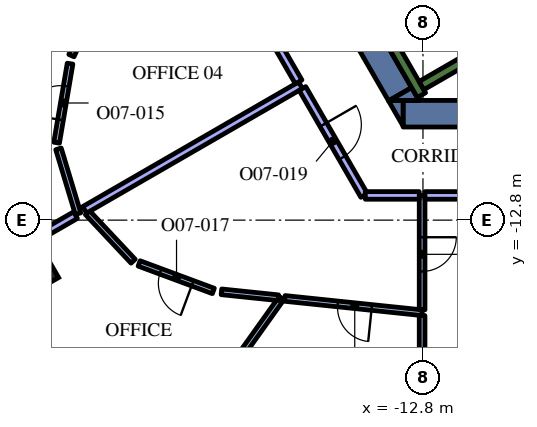
"""IFC4 building model, lengths in metres.
Left out: names, types, materials, properties, quantities, classifications, styles, units other than length and angle.
Written with IfcOpenShell. Run it as: python <this file> out.ifc"""

import sys

from ifc_helpers import new_model, si_unit, direction, frame, frame_2d, origin, origin_2d, place, context, subcontext, project, spatial, polyline, rectangle, outline, extrude, element, fill, save


model = new_model("IFC4")
c1 = context("Model", 3, precision=1e-05, world=origin(), true_north=direction((0.0, 1.0)))
c2 = subcontext(c1, "Body", "Model", "MODEL_VIEW")
j1 = project(units=[si_unit("LENGTHUNIT", "METRE"), si_unit("PLANEANGLEUNIT", "RADIAN")], contexts=[c1])
p1 = place(None, origin())
s1 = spatial("IfcSite", under=j1, at=p1, CompositionType="ELEMENT")
p2 = place(p1, origin())
s2 = spatial("IfcBuilding", under=s1, at=p2, CompositionType="ELEMENT")
p3 = place(p2, frame((0.0, 0.0, 218.4)))
s3 = spatial("IfcBuildingStorey", under=s2, at=p3, CompositionType="ELEMENT", Elevation=218.4)
p4 = place(p3, frame((-24.027, -13.872, 0.0), z_axis=(0.0, 0.0, 1.0), x_axis=(-0.866025403784, -0.5, 0.0)))
e1 = element("IfcColumn", 1, at=p4, inside=s3, PredefinedType="COLUMN", context=c2, shape_type="SweptSolid", body=[
    extrude(rectangle(XDim=2.4, YDim=2.4, at=origin_2d()), origin(), (0.0, 0.0, 1.0), 4.2),
])
p5 = place(p3, frame((8.904, -10.0, 0.0), z_axis=(0.0, 0.0, 1.0), x_axis=(-1.0, 0.0, 0.0)))
e2 = element("IfcWall", 2, at=p5, inside=s3, PredefinedType="SOLIDWALL", context=c2, shape_type="SweptSolid", body=[
    extrude(rectangle(XDim=22.226, YDim=0.7, at=frame_2d((11.113, 0.0))), origin(), (0.0, 0.0, 1.0), 4.2),
])
p6 = place(p3, origin())
e3 = element("IfcWall", 3, at=p6, inside=s3, PredefinedType="SOLIDWALL", context=c2, shape_type="SweptSolid", body=[
    extrude(outline(polyline([(-13.712, -9.65), (-13.324, -9.65), (-13.324, -10.322), (-13.712, -9.65)])), origin(), (0.0, 0.0, 1.0), 4.2),
])
p7 = place(p3, frame((-13.402, -9.487, 0.0), z_axis=(0.0, 0.0, 1.0), x_axis=(-0.500020498207, 0.866013568815, 0.0)))
e4 = element("IfcWall", 4, at=p7, inside=s3, PredefinedType="SOLIDWALL", context=c2, shape_type="SweptSolid", body=[
    extrude(rectangle(XDim=3.829, YDim=0.7, at=frame_2d((1.915, 0.0))), origin(), (0.0, 0.0, 1.0), 4.2),
])
e5 = element("IfcWall", 5, at=p6, inside=s3, PredefinedType="SOLIDWALL", context=c2, shape_type="SweptSolid", body=[
    extrude(outline(polyline([(-12.904, -9.65), (-13.68, -9.65), (-13.098, -9.314), (-12.904, -9.65)])), origin(), (0.0, 0.0, 1.0), 4.2),
])
p8 = place(p3, frame((-12.84, -9.511, 0.0), z_axis=(0.0, 0.0, 1.0), x_axis=(-0.499997733992, 0.866026712061, 0.0)))
e6 = element("IfcWall", 6, at=p8, inside=s3, PredefinedType="SOLIDWALL", context=c2, shape_type="SweptSolid", body=[
    extrude(rectangle(XDim=3.634, YDim=0.25, at=frame_2d((1.817, 0.0))), origin(), (0.0, 0.0, 1.0), 4.2),
])
p9 = place(p3, frame((-12.84, -9.261, 0.0), z_axis=(0.0, 0.0, 1.0), x_axis=(0.866016039709, 0.500016218704, 0.0)))
e7 = element("IfcWall", 7, at=p9, inside=s3, PredefinedType="SOLIDWALL", context=c2, shape_type="SweptSolid", body=[
    extrude(rectangle(XDim=7.05, YDim=0.25, at=frame_2d((3.525, 0.0))), origin(), (0.0, 0.0, 1.0), 4.2),
])
p10 = place(p3, frame((-21.386, -6.983, 0.0), z_axis=(0.0, 0.0, 1.0), x_axis=(-0.407597309494, -0.91316177827, 0.0)))
e8 = element("IfcWall", 8, at=p10, inside=s3, PredefinedType="PARTITIONING", context=c2, shape_type="SweptSolid", body=[
    extrude(rectangle(XDim=1.63, YDim=0.15, at=frame_2d((0.815, 0.0))), origin(), (0.0, 0.0, 1.0), 3.45),
])
p11 = place(p3, frame((-22.44, -10.763, 0.0), z_axis=(0.0, 0.0, 1.0), x_axis=(0.167682096872, 0.985841120257, 0.0)))
e9 = element("IfcWall", 9, at=p11, inside=s3, PredefinedType="PARTITIONING", context=c2, shape_type="SweptSolid", body=[
    extrude(rectangle(XDim=2.11, YDim=0.15, at=frame_2d((1.055, 0.0))), origin(), (0.0, 0.0, 1.0), 3.45),
])
p12 = place(p11, frame((0.61, 0.0, 0.0)))
e10 = element("IfcOpeningElement", 10, at=p12, cuts=e9, PredefinedType="OPENING", context=c2, shape_type="SweptSolid", body=[
    extrude(rectangle(XDim=0.9, YDim=2.1, at=frame_2d((0.45, 1.05))), frame((0.0, 0.085, 0.0), z_axis=(0.0, -1.0, 0.0), x_axis=(1.0, 0.0, 0.0)), (0.0, 0.0, 1.0), 0.17),
])
p13 = place(p3, frame((-22.391, -10.924, 0.0), z_axis=(0.0, 0.0, 1.0), x_axis=(0.288642134652, -0.957437056993, 0.0)))
e11 = element("IfcWall", 11, at=p13, inside=s3, PredefinedType="PARTITIONING", context=c2, shape_type="SweptSolid", body=[
    extrude(rectangle(XDim=1.782, YDim=0.15, at=frame_2d((0.891, 0.0))), origin(), (0.0, 0.0, 1.0), 3.45),
])
p14 = place(p3, frame((-21.943, -12.669, 0.0), z_axis=(0.0, 0.0, 1.0), x_axis=(-0.866030586491, -0.499991023182, 0.0)))
e12 = element("IfcWall", 12, at=p14, inside=s3, PredefinedType="PARTITIONING", context=c2, shape_type="SweptSolid", body=[
    extrude(rectangle(XDim=1.207, YDim=0.2, at=frame_2d((0.603, 0.0))), origin(), (0.0, 0.0, 1.0), 3.45),
])
p15 = place(p3, frame((-16.021, -9.25, 0.0), z_axis=(0.0, 0.0, 1.0), x_axis=(-0.866021955858, -0.500005971936, 0.0)))
e13 = element("IfcWall", 13, at=p15, inside=s3, PredefinedType="PARTITIONING", context=c2, shape_type="SweptSolid", body=[
    extrude(rectangle(XDim=6.56, YDim=0.2, at=frame_2d((3.28, 0.0))), origin(), (0.0, 0.0, 1.0), 3.45),
])
p16 = place(p3, frame((-17.681, -6.376, 0.0), z_axis=(0.0, 0.0, 1.0), x_axis=(0.500022299258, -0.866012528919, 0.0)))
e14 = element("IfcWall", 14, at=p16, inside=s3, PredefinedType="PARTITIONING", context=c2, shape_type="SweptSolid", body=[
    extrude(rectangle(XDim=3.219, YDim=0.2, at=frame_2d((1.609, 0.0))), origin(), (0.0, 0.0, 1.0), 3.45),
])
p17 = place(p3, frame((-16.521, -14.851, 0.0), z_axis=(0.0, 0.0, 1.0), x_axis=(-0.58104805465, -0.813869251285, 0.0)))
e15 = element("IfcWall", 15, at=p17, inside=s3, PredefinedType="PARTITIONING", context=c2, shape_type="SweptSolid", body=[
    extrude(rectangle(XDim=3.766, YDim=0.15, at=frame_2d((1.883, 0.0))), origin(), (0.0, 0.0, 1.0), 3.45),
])
p18 = place(p3, frame((-21.628, -12.603, 0.0), z_axis=(0.0, 0.0, 1.0), x_axis=(0.684778496912, -0.728751267695, 0.0)))
e16 = element("IfcWall", 16, at=p18, inside=s3, PredefinedType="PARTITIONING", context=c2, shape_type="SweptSolid", body=[
    extrude(rectangle(XDim=1.754, YDim=0.15, at=frame_2d((0.877, 0.0))), origin(), (0.0, 0.0, 1.0), 3.45),
])
p19 = place(p3, frame((-18.316, -14.664, 0.0), z_axis=(0.0, 0.0, 1.0), x_axis=(-0.937594570401, 0.347730386297, 0.0)))
e17 = element("IfcWall", 17, at=p19, inside=s3, PredefinedType="PARTITIONING", context=c2, shape_type="SweptSolid", body=[
    extrude(rectangle(XDim=2.083, YDim=0.15, at=frame_2d((1.042, 0.0))), origin(), (0.0, 0.0, 1.0), 3.45),
])
p20 = place(p19, frame((0.583, 0.0, 0.0)))
e18 = element("IfcOpeningElement", 18, at=p20, cuts=e17, PredefinedType="OPENING", context=c2, shape_type="SweptSolid", body=[
    extrude(rectangle(XDim=0.9, YDim=2.1, at=frame_2d((0.45, 1.05))), frame((0.0, 0.085, 0.0), z_axis=(0.0, -1.0, 0.0), x_axis=(1.0, 0.0, 0.0)), (0.0, 0.0, 1.0), 0.17),
])
p21 = place(p3, frame((-18.103, -14.686, 0.0), z_axis=(0.0, 0.0, 1.0), x_axis=(0.994622241781, -0.103569281909, 0.0)))
e19 = element("IfcWall", 19, at=p21, inside=s3, PredefinedType="PARTITIONING", context=c2, shape_type="SweptSolid", body=[
    extrude(rectangle(XDim=1.504, YDim=0.15, at=frame_2d((0.752, 0.0))), origin(), (0.0, 0.0, 1.0), 3.45),
])
p22 = place(p3, frame((-12.823, -15.236, 0.0), z_axis=(0.0, 0.0, 1.0), x_axis=(-0.994621582944, 0.10357560882, 0.0)))
e20 = element("IfcWall", 20, at=p22, inside=s3, PredefinedType="PARTITIONING", context=c2, shape_type="SweptSolid", body=[
    extrude(rectangle(XDim=3.632, YDim=0.15, at=frame_2d((1.816, 0.0))), origin(), (0.0, 0.0, 1.0), 3.45),
])
p23 = place(p22, frame((1.332, 0.0, 0.0)))
e21 = element("IfcOpeningElement", 21, at=p23, cuts=e20, PredefinedType="OPENING", context=c2, shape_type="SweptSolid", body=[
    extrude(rectangle(XDim=0.9, YDim=2.1, at=frame_2d((0.45, 1.05))), frame((0.0, 0.085, 0.0), z_axis=(0.0, -1.0, 0.0), x_axis=(1.0, 0.0, 0.0)), (0.0, 0.0, 1.0), 0.17),
])
p24 = place(p3, frame((-12.823, -15.312, 0.0), z_axis=(0.0, 0.0, 1.0), x_axis=(0.0, -1.0, 0.0)))
e22 = element("IfcWall", 22, at=p24, inside=s3, PredefinedType="PARTITIONING", context=c2, shape_type="SweptSolid", body=[
    extrude(rectangle(XDim=3.184, YDim=0.15, at=frame_2d((1.592, 0.0))), origin(), (0.0, 0.0, 1.0), 3.45),
])
p25 = place(p3, frame((-12.823, -12.15, 0.0), z_axis=(0.0, 0.0, 1.0), x_axis=(0.0, -1.0, 0.0)))
e23 = element("IfcWall", 23, at=p25, inside=s3, PredefinedType="PARTITIONING", context=c2, shape_type="SweptSolid", body=[
    extrude(rectangle(XDim=3.011, YDim=0.15, at=frame_2d((1.505, 0.0))), origin(), (0.0, 0.0, 1.0), 3.45),
])
p26 = place(p25, frame((1.1, 0.0, 0.0)))
e24 = element("IfcOpeningElement", 24, at=p26, cuts=e23, PredefinedType="OPENING", context=c2, shape_type="SweptSolid", body=[
    extrude(rectangle(XDim=0.9, YDim=2.1, at=frame_2d((0.45, 1.05))), frame((0.0, 0.085, 0.0), z_axis=(0.0, -1.0, 0.0), x_axis=(1.0, 0.0, 0.0)), (0.0, 0.0, 1.0), 0.17),
])
p27 = place(p3, frame((-15.971, -9.337, 0.0), z_axis=(0.0, 0.0, 1.0), x_axis=(0.500010870188, -0.866019127788, 0.0)))
e25 = element("IfcWall", 25, at=p27, inside=s3, PredefinedType="PARTITIONING", context=c2, shape_type="SweptSolid", body=[
    extrude(rectangle(XDim=3.249, YDim=0.2, at=frame_2d((1.624, 0.0))), origin(), (0.0, 0.0, 1.0), 3.45),
])
p28 = place(p27, frame((1.1, 0.0, 0.0)))
e26 = element("IfcOpeningElement", 26, at=p28, cuts=e25, PredefinedType="OPENING", context=c2, shape_type="SweptSolid", body=[
    extrude(rectangle(XDim=1.0, YDim=2.1, at=frame_2d((0.5, 1.05))), frame((0.0, 0.11, 0.0), z_axis=(0.0, -1.0, 0.0), x_axis=(1.0, 0.0, 0.0)), (0.0, 0.0, 1.0), 0.22),
])
p29 = place(p3, frame((-14.317, -12.15, 0.0), z_axis=(0.0, 0.0, 1.0), x_axis=(1.0, 0.0, 0.0)))
e27 = element("IfcWall", 27, at=p29, inside=s3, PredefinedType="PARTITIONING", context=c2, shape_type="SweptSolid", body=[
    extrude(rectangle(XDim=1.419, YDim=0.2, at=frame_2d((0.71, 0.0))), origin(), (0.0, 0.0, 1.0), 3.45),
])
p30 = place(p3, frame((-12.748, -12.15, 0.0), z_axis=(0.0, 0.0, 1.0), x_axis=(1.0, 0.0, 0.0)))
e28 = element("IfcWall", 28, at=p30, inside=s3, PredefinedType="PARTITIONING", context=c2, shape_type="SweptSolid", body=[
    extrude(rectangle(XDim=8.718, YDim=0.2, at=frame_2d((4.359, 0.0))), origin(), (0.0, 0.0, 1.0), 3.45),
])
p31 = place(p12, origin())
e29 = element("IfcDoor", 29, at=p31, inside=s3, OperationType="SINGLE_SWING_RIGHT", PredefinedType="DOOR", context=c2, shape_type="SweptSolid", body=[
    extrude(rectangle(XDim=0.9, YDim=2.1, at=frame_2d((0.45, 1.05))), frame((0.0, 0.025, 0.0), z_axis=(0.0, -1.0, 0.0), x_axis=(1.0, 0.0, 0.0)), (0.0, 0.0, 1.0), 0.05),
])
fill(e10, e29)
p32 = place(p20, origin())
e30 = element("IfcDoor", 30, at=p32, inside=s3, OperationType="SINGLE_SWING_LEFT", PredefinedType="DOOR", context=c2, shape_type="SweptSolid", body=[
    extrude(rectangle(XDim=0.9, YDim=2.1, at=frame_2d((0.45, 1.05))), frame((0.0, 0.025, 0.0), z_axis=(0.0, -1.0, 0.0), x_axis=(1.0, 0.0, 0.0)), (0.0, 0.0, 1.0), 0.05),
])
fill(e18, e30)
p33 = place(p23, origin())
e31 = element("IfcDoor", 31, at=p33, inside=s3, OperationType="SINGLE_SWING_LEFT", PredefinedType="DOOR", context=c2, shape_type="SweptSolid", body=[
    extrude(rectangle(XDim=0.9, YDim=2.1, at=frame_2d((0.45, 1.05))), frame((0.0, 0.025, 0.0), z_axis=(0.0, -1.0, 0.0), x_axis=(1.0, 0.0, 0.0)), (0.0, 0.0, 1.0), 0.05),
])
fill(e21, e31)
p34 = place(p28, origin())
e32 = element("IfcDoor", 32, at=p34, inside=s3, OperationType="SINGLE_SWING_LEFT", PredefinedType="DOOR", context=c2, shape_type="SweptSolid", body=[
    extrude(rectangle(XDim=1.0, YDim=2.1, at=frame_2d((0.5, 1.05))), frame((0.0, 0.025, 0.0), z_axis=(0.0, -1.0, 0.0), x_axis=(1.0, 0.0, 0.0)), (0.0, 0.0, 1.0), 0.05),
])
fill(e26, e32)
p35 = place(p26, origin())
e33 = element("IfcDoor", 33, at=p35, inside=s3, OperationType="SINGLE_SWING_RIGHT", PredefinedType="DOOR", context=c2, shape_type="SweptSolid", body=[
    extrude(rectangle(XDim=0.9, YDim=2.1, at=frame_2d((0.45, 1.05))), frame((0.0, 0.025, 0.0), z_axis=(0.0, -1.0, 0.0), x_axis=(1.0, 0.0, 0.0)), (0.0, 0.0, 1.0), 0.05),
])
fill(e24, e33)
save(model, sys.argv[1])
